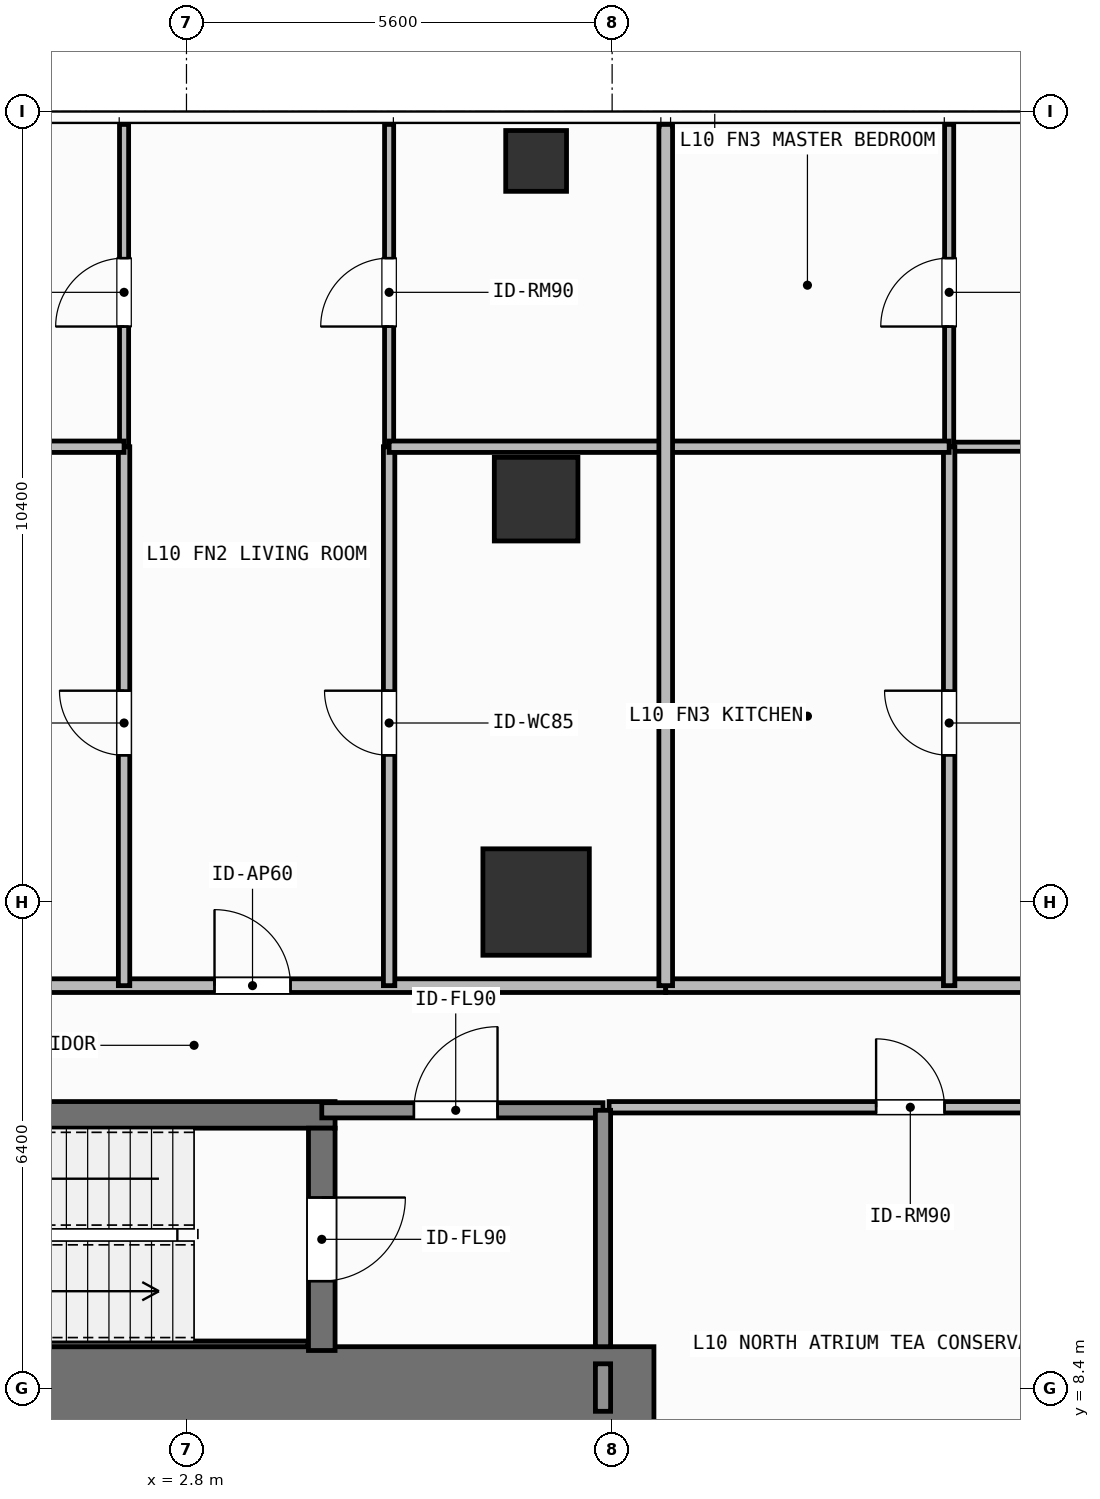
"""IFC4 building model, lengths in metres.
Left out: names, types, materials, properties, quantities, classifications, styles, units other than length and angle.
Written with IfcOpenShell. Run it as: python <this file> out.ifc"""

import sys

from ifc_helpers import new_model, si_unit, direction, frame, frame_2d, origin, origin_2d, place, context, subcontext, project, spatial, rectangle, hollow_rectangle, extrude, element, fill, save


model = new_model("IFC4")
c1 = context("Model", 3, precision=1e-05, world=origin(), true_north=direction((0.0, 1.0)))
c2 = subcontext(c1, "Body", "Model", "MODEL_VIEW")
j1 = project(units=[si_unit("LENGTHUNIT", "METRE"), si_unit("PLANEANGLEUNIT", "RADIAN")], contexts=[c1])
p1 = place(None, origin())
s1 = spatial("IfcSite", under=j1, at=p1, CompositionType="ELEMENT")
p2 = place(p1, origin())
s2 = spatial("IfcBuilding", under=s1, at=p2, CompositionType="ELEMENT")
p3 = place(p2, frame((0.0, 0.0, 38.4)))
s3 = spatial("IfcBuildingStorey", under=s2, at=p3, CompositionType="ELEMENT", Elevation=38.4)
p4 = place(p3, frame((-7.55, 8.4, 0.0), z_axis=(0.0, 0.0, 1.0), x_axis=(1.0, 0.0, 0.0)))
e1 = element("IfcWall", 1, at=p4, inside=s3, PredefinedType="SHEAR", context=c2, shape_type="SweptSolid", body=[
    extrude(rectangle(XDim=16.5, YDim=1.1, at=frame_2d((8.25, 0.0))), origin(), (0.0, 0.0, 1.0), 3.9),
])
p5 = place(p3, frame((-2.555, 12.0, 0.0), z_axis=(0.0, 0.0, 1.0), x_axis=(1.0, 0.0, 0.0)))
e2 = element("IfcWall", 2, at=p5, inside=s3, PredefinedType="SHEAR", context=c2, shape_type="SweptSolid", body=[
    extrude(rectangle(XDim=7.31, YDim=0.35, at=frame_2d((3.655, 0.0))), origin(), (0.0, 0.0, 1.0), 3.9),
])
p6 = place(p3, frame((-2.2, 8.988, 0.0), z_axis=(0.0, 0.0, 1.0), x_axis=(1.0, 0.0, 0.0)))
e3 = element("IfcWall", 3, at=p6, inside=s3, PredefinedType="SHEAR", context=c2, shape_type="SweptSolid", body=[
    extrude(rectangle(XDim=6.6, YDim=0.075, at=frame_2d((3.3, 0.0))), origin(), (0.0, 0.0, 1.0), 3.9),
])
p7 = place(p3, frame((4.58, 11.825, 0.0), z_axis=(0.0, 0.0, 1.0), x_axis=(0.0, -1.0, 0.0)))
e4 = element("IfcWall", 4, at=p7, inside=s3, PredefinedType="SHEAR", context=c2, shape_type="SweptSolid", body=[
    extrude(rectangle(XDim=2.925, YDim=0.35, at=frame_2d((1.462, 0.0))), origin(), (0.0, 0.0, 1.0), 3.9),
])
p8 = place(p7, frame((0.913, 0.0, 0.0)))
e5 = element("IfcOpeningElement", 5, at=p8, cuts=e4, PredefinedType="OPENING", context=c2, shape_type="SweptSolid", body=[
    extrude(rectangle(XDim=1.1, YDim=2.15, at=frame_2d((0.55, 1.075))), frame((0.0, 0.185, 0.0), z_axis=(0.0, -1.0, 0.0), x_axis=(1.0, 0.0, 0.0)), (0.0, 0.0, 1.0), 0.37),
])
p9 = place(p3, frame((7.4, 14.8, 0.0), z_axis=(0.0, 0.0, 1.0), x_axis=(1.0, 0.0, 0.0)))
e6 = element("IfcColumn", 6, at=p9, inside=s3, PredefinedType="COLUMN", context=c2, shape_type="SweptSolid", body=[
    extrude(rectangle(XDim=1.4, YDim=1.4, at=origin_2d()), origin(), (0.0, 0.0, 1.0), 3.9),
])
p10 = place(p3, frame((7.4, 20.1, 0.0), z_axis=(0.0, 0.0, 1.0), x_axis=(1.0, 0.0, 0.0)))
e7 = element("IfcColumn", 7, at=p10, inside=s3, PredefinedType="COLUMN", context=c2, shape_type="SweptSolid", body=[
    extrude(rectangle(XDim=1.1, YDim=1.1, at=origin_2d()), origin(), (0.0, 0.0, 1.0), 3.9),
])
p11 = place(p3, frame((7.4, 24.55, 0.0), z_axis=(0.0, 0.0, 1.0), x_axis=(1.0, 0.0, 0.0)))
e8 = element("IfcColumn", 8, at=p11, inside=s3, PredefinedType="COLUMN", context=c2, shape_type="SweptSolid", body=[
    extrude(hollow_rectangle(XDim=0.8, YDim=0.8, WallThickness=0.036, at=origin_2d()), origin(), (0.0, 0.0, 1.0), 3.9),
])
p12 = place(p3, frame((4.58, 12.06, 0.0), z_axis=(0.0, 0.0, 1.0), x_axis=(1.0, 0.0, 0.0)))
e9 = element("IfcWall", 9, at=p12, inside=s3, PredefinedType="SOLIDWALL", context=c2, shape_type="SweptSolid", body=[
    extrude(rectangle(XDim=3.7, YDim=0.2, at=frame_2d((1.85, 0.0))), origin(), (0.0, 0.0, 1.0), 3.68),
])
p13 = place(p12, frame((1.212, 0.0, 0.0)))
e10 = element("IfcOpeningElement", 10, at=p13, cuts=e9, PredefinedType="OPENING", context=c2, shape_type="SweptSolid", body=[
    extrude(rectangle(XDim=1.1, YDim=2.15, at=frame_2d((0.55, 1.075))), frame((0.0, 0.11, 0.0), z_axis=(0.0, -1.0, 0.0), x_axis=(1.0, 0.0, 0.0)), (0.0, 0.0, 1.0), 0.22),
])
p14 = place(p3, frame((8.36, 12.1, 0.0), z_axis=(0.0, 0.0, 1.0), x_axis=(1.0, 0.0, 0.0)))
e11 = element("IfcWall", 11, at=p14, inside=s3, PredefinedType="PARTITIONING", context=c2, shape_type="SweptSolid", body=[
    extrude(rectangle(XDim=7.22, YDim=0.15, at=frame_2d((3.61, 0.0))), origin(), (0.0, 0.0, 1.0), 3.68),
])
p15 = place(p14, frame((3.513, 0.0, 0.0)))
e12 = element("IfcOpeningElement", 12, at=p15, cuts=e11, PredefinedType="OPENING", context=c2, shape_type="SweptSolid", body=[
    extrude(rectangle(XDim=0.9, YDim=2.1, at=frame_2d((0.45, 1.05))), frame((0.0, 0.085, 0.0), z_axis=(0.0, -1.0, 0.0), x_axis=(1.0, 0.0, 0.0)), (0.0, 0.0, 1.0), 0.17),
])
p16 = place(p3, frame((-2.121, 13.7, 0.0), z_axis=(0.0, 0.0, 1.0), x_axis=(1.0, 0.0, 0.0)))
e13 = element("IfcWall", 13, at=p16, inside=s3, PredefinedType="PARTITIONING", context=c2, shape_type="SweptSolid", body=[
    extrude(rectangle(XDim=11.226, YDim=0.18, at=frame_2d((5.613, 0.0))), origin(), (0.0, 0.0, 1.0), 3.68),
])
p17 = place(p16, frame((5.29, 0.0, 0.0)))
e14 = element("IfcOpeningElement", 14, at=p17, cuts=e13, PredefinedType="OPENING", context=c2, shape_type="SweptSolid", body=[
    extrude(rectangle(XDim=1.0, YDim=2.2, at=frame_2d((0.5, 1.1))), frame((0.0, 0.1, 0.0), z_axis=(0.0, -1.0, 0.0), x_axis=(1.0, 0.0, 0.0)), (0.0, 0.0, 1.0), 0.2),
])
p18 = place(p3, frame((1.979, 13.7, 0.0), z_axis=(0.0, 0.0, 1.0), x_axis=(0.0, 1.0, 0.0)))
e15 = element("IfcWall", 15, at=p18, inside=s3, PredefinedType="PARTITIONING", context=c2, shape_type="SweptSolid", body=[
    extrude(rectangle(XDim=7.09, YDim=0.15, at=frame_2d((3.545, 0.0))), origin(), (0.0, 0.0, 1.0), 3.68),
])
p19 = place(p18, frame((3.03, 0.0, 0.0)))
e16 = element("IfcOpeningElement", 16, at=p19, cuts=e15, PredefinedType="OPENING", context=c2, shape_type="SweptSolid", body=[
    extrude(rectangle(XDim=0.85, YDim=2.1, at=frame_2d((0.425, 1.05))), frame((0.0, 0.085, 0.0), z_axis=(0.0, -1.0, 0.0), x_axis=(1.0, 0.0, 0.0)), (0.0, 0.0, 1.0), 0.17),
])
p20 = place(p3, frame((1.979, 20.79, 0.0), z_axis=(0.0, 0.0, 1.0), x_axis=(0.0, 1.0, 0.0)))
e17 = element("IfcWall", 17, at=p20, inside=s3, PredefinedType="PARTITIONING", context=c2, shape_type="SweptSolid", body=[
    extrude(rectangle(XDim=4.24, YDim=0.12, at=frame_2d((2.12, 0.0))), origin(), (0.0, 0.0, 1.0), 3.68),
])
p21 = place(p20, frame((1.581, 0.0, 0.0)))
e18 = element("IfcOpeningElement", 18, at=p21, cuts=e17, PredefinedType="OPENING", context=c2, shape_type="SweptSolid", body=[
    extrude(rectangle(XDim=0.9, YDim=2.1, at=frame_2d((0.45, 1.05))), frame((0.0, 0.07, 0.0), z_axis=(0.0, -1.0, 0.0), x_axis=(1.0, 0.0, 0.0)), (0.0, 0.0, 1.0), 0.14),
])
p22 = place(p3, frame((5.466, 13.7, 0.0), z_axis=(0.0, 0.0, 1.0), x_axis=(0.0, 1.0, 0.0)))
e19 = element("IfcWall", 19, at=p22, inside=s3, PredefinedType="PARTITIONING", context=c2, shape_type="SweptSolid", body=[
    extrude(rectangle(XDim=7.09, YDim=0.15, at=frame_2d((3.545, 0.0))), origin(), (0.0, 0.0, 1.0), 3.68),
])
p23 = place(p22, frame((3.03, 0.0, 0.0)))
e20 = element("IfcOpeningElement", 20, at=p23, cuts=e19, PredefinedType="OPENING", context=c2, shape_type="SweptSolid", body=[
    extrude(rectangle(XDim=0.85, YDim=2.1, at=frame_2d((0.425, 1.05))), frame((0.0, 0.085, 0.0), z_axis=(0.0, -1.0, 0.0), x_axis=(1.0, 0.0, 0.0)), (0.0, 0.0, 1.0), 0.17),
])
p24 = place(p3, frame((5.466, 20.79, 0.0), z_axis=(0.0, 0.0, 1.0), x_axis=(0.0, 1.0, 0.0)))
e21 = element("IfcWall", 21, at=p24, inside=s3, PredefinedType="PARTITIONING", context=c2, shape_type="SweptSolid", body=[
    extrude(rectangle(XDim=4.24, YDim=0.12, at=frame_2d((2.12, 0.0))), origin(), (0.0, 0.0, 1.0), 3.68),
])
p25 = place(p24, frame((1.581, 0.0, 0.0)))
e22 = element("IfcOpeningElement", 22, at=p25, cuts=e21, PredefinedType="OPENING", context=c2, shape_type="SweptSolid", body=[
    extrude(rectangle(XDim=0.9, YDim=2.1, at=frame_2d((0.45, 1.05))), frame((0.0, 0.07, 0.0), z_axis=(0.0, -1.0, 0.0), x_axis=(1.0, 0.0, 0.0)), (0.0, 0.0, 1.0), 0.14),
])
p26 = place(p3, frame((9.105, 13.7, 0.0), z_axis=(0.0, 0.0, 1.0), x_axis=(1.0, 0.0, 0.0)))
e23 = element("IfcWall", 23, at=p26, inside=s3, PredefinedType="PARTITIONING", context=c2, shape_type="SweptSolid", body=[
    extrude(rectangle(XDim=15.315, YDim=0.18, at=frame_2d((7.657, 0.0))), origin(), (0.0, 0.0, 1.0), 3.68),
])
p27 = place(p26, frame((7.516, 0.0, 0.0)))
e24 = element("IfcOpeningElement", 24, at=p27, cuts=e23, PredefinedType="OPENING", context=c2, shape_type="SweptSolid", body=[
    extrude(rectangle(XDim=1.0, YDim=2.2, at=frame_2d((0.5, 1.1))), frame((0.0, 0.1, 0.0), z_axis=(0.0, -1.0, 0.0), x_axis=(1.0, 0.0, 0.0)), (0.0, 0.0, 1.0), 0.2),
])
p28 = place(p3, frame((12.834, 20.79, 0.0), z_axis=(0.0, 0.0, 1.0), x_axis=(1.0, 0.0, 0.0)))
e25 = element("IfcWall", 25, at=p28, inside=s3, PredefinedType="PARTITIONING", context=c2, shape_type="SweptSolid", body=[
    extrude(rectangle(XDim=8.496, YDim=0.12, at=frame_2d((4.248, 0.0))), origin(), (0.0, 0.0, 1.0), 3.68),
])
p29 = place(p28, frame((3.709, 0.0, 0.0)))
e26 = element("IfcOpeningElement", 26, at=p29, cuts=e25, PredefinedType="OPENING", context=c2, shape_type="SweptSolid", body=[
    extrude(rectangle(XDim=0.9, YDim=2.1, at=frame_2d((0.45, 1.05))), frame((0.0, 0.07, 0.0), z_axis=(0.0, -1.0, 0.0), x_axis=(1.0, 0.0, 0.0)), (0.0, 0.0, 1.0), 0.14),
])
p30 = place(p3, frame((12.834, 13.7, 0.0), z_axis=(0.0, 0.0, 1.0), x_axis=(0.0, 1.0, 0.0)))
e27 = element("IfcWall", 27, at=p30, inside=s3, PredefinedType="PARTITIONING", context=c2, shape_type="SweptSolid", body=[
    extrude(rectangle(XDim=7.09, YDim=0.15, at=frame_2d((3.545, 0.0))), origin(), (0.0, 0.0, 1.0), 3.68),
])
p31 = place(p30, frame((3.03, 0.0, 0.0)))
e28 = element("IfcOpeningElement", 28, at=p31, cuts=e27, PredefinedType="OPENING", context=c2, shape_type="SweptSolid", body=[
    extrude(rectangle(XDim=0.85, YDim=2.1, at=frame_2d((0.425, 1.05))), frame((0.0, 0.085, 0.0), z_axis=(0.0, -1.0, 0.0), x_axis=(1.0, 0.0, 0.0)), (0.0, 0.0, 1.0), 0.17),
])
p32 = place(p3, frame((12.834, 20.79, 0.0), z_axis=(0.0, 0.0, 1.0), x_axis=(0.0, 1.0, 0.0)))
e29 = element("IfcWall", 29, at=p32, inside=s3, PredefinedType="PARTITIONING", context=c2, shape_type="SweptSolid", body=[
    extrude(rectangle(XDim=4.24, YDim=0.12, at=frame_2d((2.12, 0.0))), origin(), (0.0, 0.0, 1.0), 3.68),
])
p33 = place(p32, frame((1.581, 0.0, 0.0)))
e30 = element("IfcOpeningElement", 30, at=p33, cuts=e29, PredefinedType="OPENING", context=c2, shape_type="SweptSolid", body=[
    extrude(rectangle(XDim=0.9, YDim=2.1, at=frame_2d((0.45, 1.05))), frame((0.0, 0.07, 0.0), z_axis=(0.0, -1.0, 0.0), x_axis=(1.0, 0.0, 0.0)), (0.0, 0.0, 1.0), 0.14),
])
p34 = place(p3, frame((8.28, 8.95, 0.0), z_axis=(0.0, 0.0, 1.0), x_axis=(0.0, 1.0, 0.0)))
e31 = element("IfcWall", 31, at=p34, inside=s3, PredefinedType="SOLIDWALL", context=c2, shape_type="SweptSolid", body=[
    extrude(rectangle(XDim=3.11, YDim=0.2, at=frame_2d((1.555, 0.0))), origin(), (0.0, 0.0, 1.0), 3.68),
])
p35 = place(p3, frame((8.28, 8.1, 0.0), z_axis=(0.0, 0.0, 1.0), x_axis=(0.0, 1.0, 0.0)))
e32 = element("IfcWall", 32, at=p35, inside=s3, PredefinedType="SOLIDWALL", context=c2, shape_type="SweptSolid", body=[
    extrude(rectangle(XDim=0.625, YDim=0.2, at=frame_2d((0.312, 0.0))), origin(), (0.0, 0.0, 1.0), 3.68),
])
p36 = place(p3, frame((-2.121, 20.79, 0.0), z_axis=(0.0, 0.0, 1.0), x_axis=(1.0, 0.0, 0.0)))
e33 = element("IfcWall", 33, at=p36, inside=s3, PredefinedType="PARTITIONING", context=c2, shape_type="SweptSolid", body=[
    extrude(rectangle(XDim=4.1, YDim=0.15, at=frame_2d((2.05, 0.0))), origin(), (0.0, 0.0, 1.0), 3.68),
])
p37 = place(p3, frame((5.466, 20.79, 0.0), z_axis=(0.0, 0.0, 1.0), x_axis=(1.0, 0.0, 0.0)))
e34 = element("IfcWall", 34, at=p37, inside=s3, PredefinedType="PARTITIONING", context=c2, shape_type="SweptSolid", body=[
    extrude(rectangle(XDim=3.639, YDim=0.15, at=frame_2d((1.819, 0.0))), origin(), (0.0, 0.0, 1.0), 3.68),
])
p38 = place(p3, frame((9.105, 20.79, 0.0), z_axis=(0.0, 0.0, 1.0), x_axis=(1.0, 0.0, 0.0)))
e35 = element("IfcWall", 35, at=p38, inside=s3, PredefinedType="PARTITIONING", context=c2, shape_type="SweptSolid", body=[
    extrude(rectangle(XDim=3.729, YDim=0.15, at=frame_2d((1.865, 0.0))), origin(), (0.0, 0.0, 1.0), 3.68),
])
p39 = place(p3, frame((9.105, 13.7, 0.0), z_axis=(0.0, 0.0, 1.0), x_axis=(0.0, 1.0, 0.0)))
e36 = element("IfcWall", 36, at=p39, inside=s3, PredefinedType="PARTITIONING", context=c2, shape_type="SweptSolid", body=[
    extrude(rectangle(XDim=11.33, YDim=0.18, at=frame_2d((5.665, 0.0))), origin(), (0.0, 0.0, 1.0), 3.68),
])
p40 = place(p8, origin())
e37 = element("IfcDoor", 37, at=p40, inside=s3, OperationType="SINGLE_SWING_LEFT", PredefinedType="DOOR", context=c2, shape_type="SweptSolid", body=[
    extrude(rectangle(XDim=1.1, YDim=2.15, at=frame_2d((0.55, 1.075))), frame((0.0, 0.025, 0.0), z_axis=(0.0, -1.0, 0.0), x_axis=(1.0, 0.0, 0.0)), (0.0, 0.0, 1.0), 0.05),
])
fill(e5, e37)
p41 = place(p13, origin())
e38 = element("IfcDoor", 38, at=p41, inside=s3, OperationType="SINGLE_SWING_RIGHT", PredefinedType="DOOR", context=c2, shape_type="SweptSolid", body=[
    extrude(rectangle(XDim=1.1, YDim=2.15, at=frame_2d((0.55, 1.075))), frame((0.0, 0.025, 0.0), z_axis=(0.0, -1.0, 0.0), x_axis=(1.0, 0.0, 0.0)), (0.0, 0.0, 1.0), 0.05),
])
fill(e10, e38)
p42 = place(p15, origin())
e39 = element("IfcDoor", 39, at=p42, inside=s3, OperationType="SINGLE_SWING_LEFT", PredefinedType="DOOR", context=c2, shape_type="SweptSolid", body=[
    extrude(rectangle(XDim=0.9, YDim=2.1, at=frame_2d((0.45, 1.05))), frame((0.0, 0.025, 0.0), z_axis=(0.0, -1.0, 0.0), x_axis=(1.0, 0.0, 0.0)), (0.0, 0.0, 1.0), 0.05),
])
fill(e12, e39)
p43 = place(p17, origin())
e40 = element("IfcDoor", 40, at=p43, inside=s3, OperationType="SINGLE_SWING_LEFT", PredefinedType="DOOR", context=c2, shape_type="SweptSolid", body=[
    extrude(rectangle(XDim=1.0, YDim=2.2, at=frame_2d((0.5, 1.1))), frame((0.0, 0.025, 0.0), z_axis=(0.0, -1.0, 0.0), x_axis=(1.0, 0.0, 0.0)), (0.0, 0.0, 1.0), 0.05),
])
fill(e14, e40)
p44 = place(p19, origin())
e41 = element("IfcDoor", 41, at=p44, inside=s3, OperationType="SINGLE_SWING_RIGHT", PredefinedType="DOOR", context=c2, shape_type="SweptSolid", body=[
    extrude(rectangle(XDim=0.85, YDim=2.1, at=frame_2d((0.425, 1.05))), frame((0.0, 0.025, 0.0), z_axis=(0.0, -1.0, 0.0), x_axis=(1.0, 0.0, 0.0)), (0.0, 0.0, 1.0), 0.05),
])
fill(e16, e41)
p45 = place(p21, origin())
e42 = element("IfcDoor", 42, at=p45, inside=s3, OperationType="SINGLE_SWING_LEFT", PredefinedType="DOOR", context=c2, shape_type="SweptSolid", body=[
    extrude(rectangle(XDim=0.9, YDim=2.1, at=frame_2d((0.45, 1.05))), frame((0.0, 0.025, 0.0), z_axis=(0.0, -1.0, 0.0), x_axis=(1.0, 0.0, 0.0)), (0.0, 0.0, 1.0), 0.05),
])
fill(e18, e42)
p46 = place(p23, origin())
e43 = element("IfcDoor", 43, at=p46, inside=s3, OperationType="SINGLE_SWING_RIGHT", PredefinedType="DOOR", context=c2, shape_type="SweptSolid", body=[
    extrude(rectangle(XDim=0.85, YDim=2.1, at=frame_2d((0.425, 1.05))), frame((0.0, 0.025, 0.0), z_axis=(0.0, -1.0, 0.0), x_axis=(1.0, 0.0, 0.0)), (0.0, 0.0, 1.0), 0.05),
])
fill(e20, e43)
p47 = place(p25, origin())
e44 = element("IfcDoor", 44, at=p47, inside=s3, OperationType="SINGLE_SWING_LEFT", PredefinedType="DOOR", context=c2, shape_type="SweptSolid", body=[
    extrude(rectangle(XDim=0.9, YDim=2.1, at=frame_2d((0.45, 1.05))), frame((0.0, 0.025, 0.0), z_axis=(0.0, -1.0, 0.0), x_axis=(1.0, 0.0, 0.0)), (0.0, 0.0, 1.0), 0.05),
])
fill(e22, e44)
p48 = place(p31, origin())
e45 = element("IfcDoor", 45, at=p48, inside=s3, OperationType="SINGLE_SWING_RIGHT", PredefinedType="DOOR", context=c2, shape_type="SweptSolid", body=[
    extrude(rectangle(XDim=0.85, YDim=2.1, at=frame_2d((0.425, 1.05))), frame((0.0, 0.025, 0.0), z_axis=(0.0, -1.0, 0.0), x_axis=(1.0, 0.0, 0.0)), (0.0, 0.0, 1.0), 0.05),
])
fill(e28, e45)
p49 = place(p33, origin())
e46 = element("IfcDoor", 46, at=p49, inside=s3, OperationType="SINGLE_SWING_LEFT", PredefinedType="DOOR", context=c2, shape_type="SweptSolid", body=[
    extrude(rectangle(XDim=0.9, YDim=2.1, at=frame_2d((0.45, 1.05))), frame((0.0, 0.025, 0.0), z_axis=(0.0, -1.0, 0.0), x_axis=(1.0, 0.0, 0.0)), (0.0, 0.0, 1.0), 0.05),
])
fill(e30, e46)
save(model, sys.argv[1])
